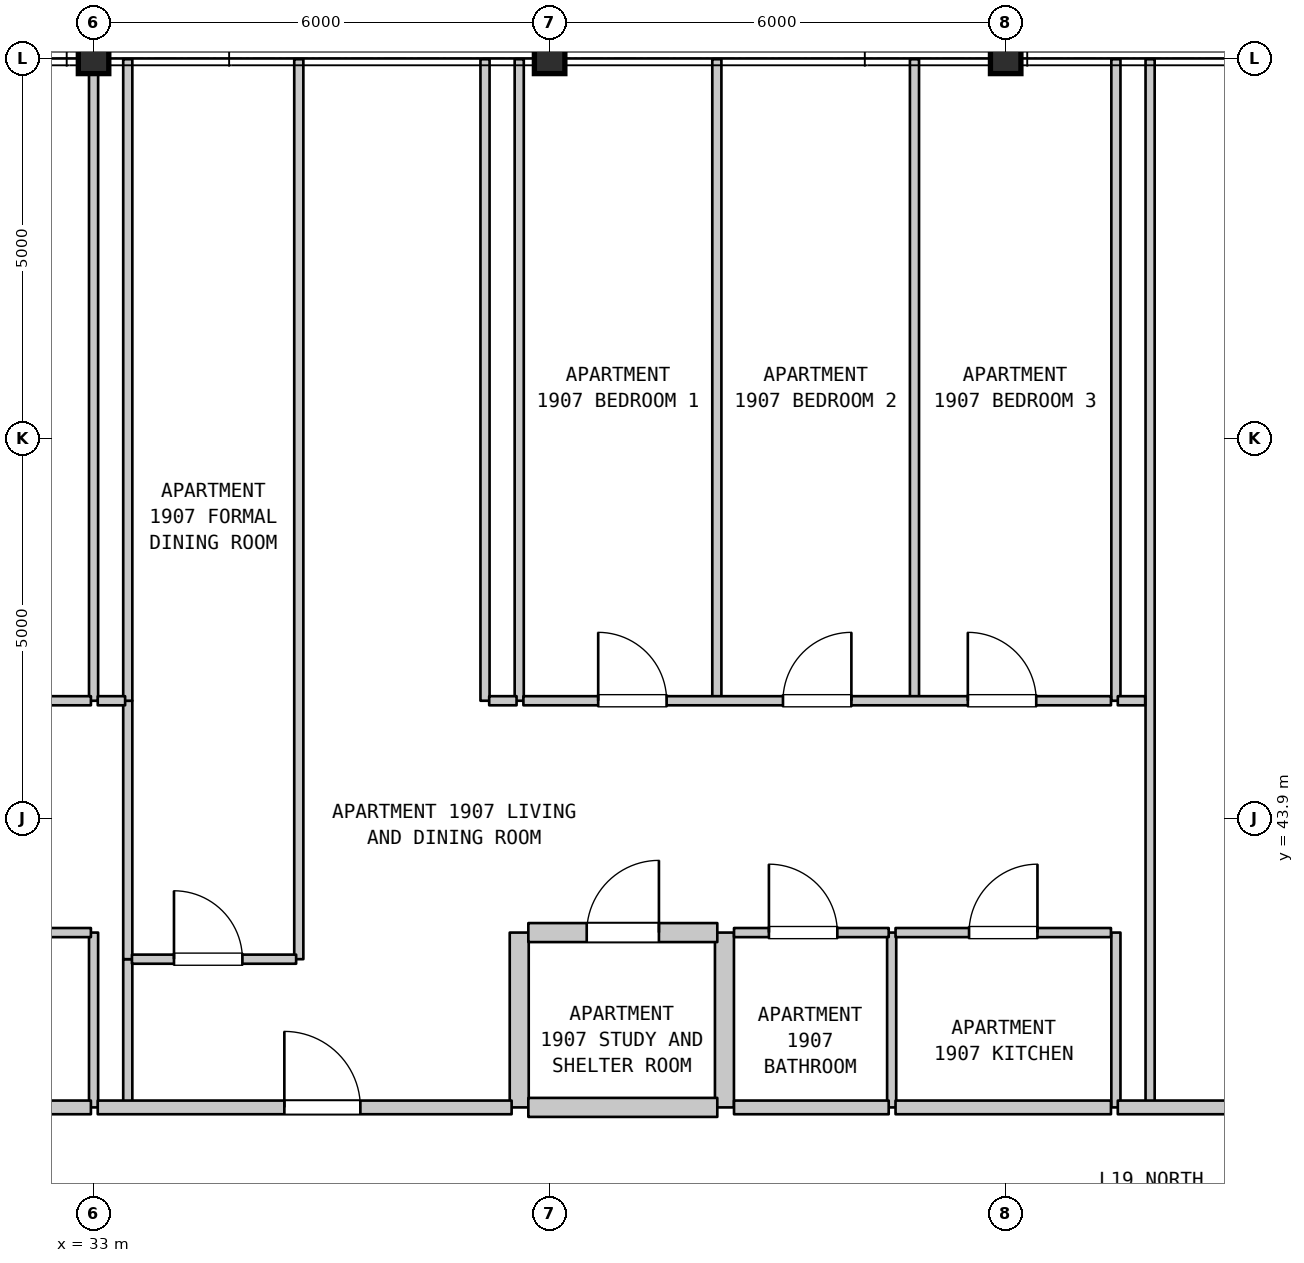
"""IFC4 building model, lengths in metres.
Left out: names, types, materials, properties, quantities, classifications, styles, units other than length and angle.
Written with IfcOpenShell. Run it as: python <this file> out.ifc"""

import sys

from ifc_helpers import new_model, si_unit, direction, frame, frame_2d, origin, origin_2d, place, context, subcontext, project, spatial, rectangle, i_section, extrude, element, fill, save


model = new_model("IFC4")
c1 = context("Model", 3, precision=1e-05, world=origin(), true_north=direction((0.0, 1.0)))
c2 = subcontext(c1, "Body", "Model", "MODEL_VIEW")
j1 = project(units=[si_unit("LENGTHUNIT", "METRE"), si_unit("PLANEANGLEUNIT", "RADIAN")], contexts=[c1])
p1 = place(None, origin())
s1 = spatial("IfcSite", under=j1, at=p1, CompositionType="ELEMENT")
p2 = place(p1, origin())
s2 = spatial("IfcBuilding", under=s1, at=p2, CompositionType="ELEMENT")
p3 = place(p2, frame((0.0, 0.0, 81.2)))
s3 = spatial("IfcBuildingStorey", under=s2, at=p3, CompositionType="ELEMENT", Elevation=81.2)
for number, where, z_axis, x_axis in (
    (1, (33.0, 53.9, 0.0), (0.0, 0.0, 1.0), (1.0, 0.0, 0.0)),
    (2, (39.0, 53.9, 0.0), (0.0, 0.0, 1.0), (1.0, 0.0, 0.0)),
    (3, (45.0, 53.9, 0.0), (0.0, 0.0, 1.0), (1.0, 0.0, 0.0)),
):
    element("IfcColumn", number, at=place(p3, frame(where, z_axis=z_axis, x_axis=x_axis)), inside=s3, PredefinedType="COLUMN", context=c2, shape_type="SweptSolid", body=[
        extrude(i_section(OverallWidth=0.401, OverallDepth=0.399, WebThickness=0.025, FlangeThickness=0.04, FilletRadius=0.015, at=origin_2d()), origin(), (0.0, 0.0, 1.0), 5.2),
    ])
p4 = place(p3, frame((33.0, 40.1, 0.0), z_axis=(0.0, 0.0, 1.0), x_axis=(0.0, 1.0, 0.0)))
e4 = element("IfcWall", 4, at=p4, inside=s3, PredefinedType="PARTITIONING", context=c2, shape_type="SweptSolid", body=[
    extrude(rectangle(XDim=2.3, YDim=0.12, at=frame_2d((1.15, 0.0))), origin(), (0.0, 0.0, 1.0), 4.285),
])
p5 = place(p3, frame((33.0, 45.45, 0.0), z_axis=(0.0, 0.0, 1.0), x_axis=(0.0, 1.0, 0.0)))
e5 = element("IfcWall", 5, at=p5, inside=s3, PredefinedType="PARTITIONING", context=c2, shape_type="SweptSolid", body=[
    extrude(rectangle(XDim=8.44, YDim=0.12, at=frame_2d((4.22, 0.0))), origin(), (0.0, 0.0, 1.0), 4.285),
])
p6 = place(p3, frame((33.45, 40.1, 0.0), z_axis=(0.0, 0.0, 1.0), x_axis=(0.0, 1.0, 0.0)))
e6 = element("IfcWall", 6, at=p6, inside=s3, PredefinedType="PARTITIONING", context=c2, shape_type="SweptSolid", body=[
    extrude(rectangle(XDim=1.95, YDim=0.12, at=frame_2d((0.975, 0.0))), origin(), (0.0, 0.0, 1.0), 4.885),
])
p7 = place(p3, frame((33.45, 42.05, 0.0), z_axis=(0.0, 0.0, 1.0), x_axis=(0.0, 1.0, 0.0)))
e7 = element("IfcWall", 7, at=p7, inside=s3, PredefinedType="PARTITIONING", context=c2, shape_type="SweptSolid", body=[
    extrude(rectangle(XDim=3.4, YDim=0.12, at=frame_2d((1.7, 0.0))), origin(), (0.0, 0.0, 1.0), 4.885),
])
p8 = place(p3, frame((33.45, 45.45, 0.0), z_axis=(0.0, 0.0, 1.0), x_axis=(0.0, 1.0, 0.0)))
e8 = element("IfcWall", 8, at=p8, inside=s3, PredefinedType="PARTITIONING", context=c2, shape_type="SweptSolid", body=[
    extrude(rectangle(XDim=8.44, YDim=0.12, at=frame_2d((4.22, 0.0))), origin(), (0.0, 0.0, 1.0), 4.885),
])
p9 = place(p3, frame((35.7, 42.05, 0.0), z_axis=(0.0, 0.0, 1.0), x_axis=(0.0, 1.0, 0.0)))
e9 = element("IfcWall", 9, at=p9, inside=s3, PredefinedType="PARTITIONING", context=c2, shape_type="SweptSolid", body=[
    extrude(rectangle(XDim=11.84, YDim=0.12, at=frame_2d((5.92, 0.0))), origin(), (0.0, 0.0, 1.0), 4.885),
])
p10 = place(p3, frame((38.15, 45.45, 0.0), z_axis=(0.0, 0.0, 1.0), x_axis=(0.0, 1.0, 0.0)))
e10 = element("IfcWall", 10, at=p10, inside=s3, PredefinedType="PARTITIONING", context=c2, shape_type="SweptSolid", body=[
    extrude(rectangle(XDim=8.44, YDim=0.12, at=frame_2d((4.22, 0.0))), origin(), (0.0, 0.0, 1.0), 4.885),
])
p11 = place(p3, frame((38.6, 40.1, 0.0), z_axis=(0.0, 0.0, 1.0), x_axis=(0.0, 1.0, 0.0)))
e11 = element("IfcWall", 11, at=p11, inside=s3, PredefinedType="STANDARD", context=c2, shape_type="SweptSolid", body=[
    extrude(rectangle(XDim=2.3, YDim=0.25, at=frame_2d((1.15, 0.0))), origin(), (0.0, 0.0, 1.0), 4.885),
])
for number, where, z_axis, x_axis in (
    (12, (38.6, 45.45, 0.0), (0.0, 0.0, 1.0), (0.0, 1.0, 0.0)),
    (13, (41.2, 45.45, 0.0), (0.0, 0.0, 1.0), (0.0, 1.0, 0.0)),
):
    element("IfcWall", number, at=place(p3, frame(where, z_axis=z_axis, x_axis=x_axis)), inside=s3, PredefinedType="PARTITIONING", context=c2, shape_type="SweptSolid", body=[
        extrude(rectangle(XDim=8.44, YDim=0.12, at=frame_2d((4.22, 0.0))), origin(), (0.0, 0.0, 1.0), 4.885),
    ])
p12 = place(p3, frame((41.3, 40.1, 0.0), z_axis=(0.0, 0.0, 1.0), x_axis=(0.0, 1.0, 0.0)))
e14 = element("IfcWall", 14, at=p12, inside=s3, PredefinedType="STANDARD", context=c2, shape_type="SweptSolid", body=[
    extrude(rectangle(XDim=2.3, YDim=0.25, at=frame_2d((1.15, 0.0))), origin(), (0.0, 0.0, 1.0), 4.885),
])
p13 = place(p3, frame((43.5, 40.1, 0.0), z_axis=(0.0, 0.0, 1.0), x_axis=(0.0, 1.0, 0.0)))
e15 = element("IfcWall", 15, at=p13, inside=s3, PredefinedType="PARTITIONING", context=c2, shape_type="SweptSolid", body=[
    extrude(rectangle(XDim=2.3, YDim=0.12, at=frame_2d((1.15, 0.0))), origin(), (0.0, 0.0, 1.0), 4.885),
])
p14 = place(p3, frame((43.8, 45.45, 0.0), z_axis=(0.0, 0.0, 1.0), x_axis=(0.0, 1.0, 0.0)))
e16 = element("IfcWall", 16, at=p14, inside=s3, PredefinedType="PARTITIONING", context=c2, shape_type="SweptSolid", body=[
    extrude(rectangle(XDim=8.44, YDim=0.12, at=frame_2d((4.22, 0.0))), origin(), (0.0, 0.0, 1.0), 4.885),
])
p15 = place(p3, frame((46.45, 40.1, 0.0), z_axis=(0.0, 0.0, 1.0), x_axis=(0.0, 1.0, 0.0)))
e17 = element("IfcWall", 17, at=p15, inside=s3, PredefinedType="PARTITIONING", context=c2, shape_type="SweptSolid", body=[
    extrude(rectangle(XDim=2.3, YDim=0.12, at=frame_2d((1.15, 0.0))), origin(), (0.0, 0.0, 1.0), 4.885),
])
p16 = place(p3, frame((46.45, 45.45, 0.0), z_axis=(0.0, 0.0, 1.0), x_axis=(0.0, 1.0, 0.0)))
e18 = element("IfcWall", 18, at=p16, inside=s3, PredefinedType="PARTITIONING", context=c2, shape_type="SweptSolid", body=[
    extrude(rectangle(XDim=8.44, YDim=0.12, at=frame_2d((4.22, 0.0))), origin(), (0.0, 0.0, 1.0), 4.885),
])
p17 = place(p3, frame((46.9, 40.1, 0.0), z_axis=(0.0, 0.0, 1.0), x_axis=(0.0, 1.0, 0.0)))
e19 = element("IfcWall", 19, at=p17, inside=s3, PredefinedType="PARTITIONING", context=c2, shape_type="SweptSolid", body=[
    extrude(rectangle(XDim=13.79, YDim=0.12, at=frame_2d((6.895, 0.0))), origin(), (0.0, 0.0, 1.0), 4.885),
])
p18 = place(p3, frame((29.523, 40.1, 0.0), z_axis=(0.0, 0.0, 1.0), x_axis=(1.0, 0.0, 0.0)))
e20 = element("IfcWall", 20, at=p18, inside=s3, PredefinedType="STANDARD", context=c2, shape_type="SweptSolid", body=[
    extrude(rectangle(XDim=3.442, YDim=0.18, at=frame_2d((1.721, 0.0))), origin(), (0.0, 0.0, 1.0), 4.885),
])
p19 = place(p3, frame((33.055, 40.1, 0.0), z_axis=(0.0, 0.0, 1.0), x_axis=(1.0, 0.0, 0.0)))
e21 = element("IfcWall", 21, at=p19, inside=s3, PredefinedType="STANDARD", context=c2, shape_type="SweptSolid", body=[
    extrude(rectangle(XDim=5.445, YDim=0.18, at=frame_2d((2.723, 0.0))), origin(), (0.0, 0.0, 1.0), 4.885),
])
p20 = place(p19, frame((2.455, 0.0, 0.0)))
e22 = element("IfcOpeningElement", 22, at=p20, cuts=e21, PredefinedType="OPENING", context=c2, shape_type="SweptSolid", body=[
    extrude(rectangle(XDim=1.0, YDim=2.15, at=frame_2d((0.5, 1.075))), frame((0.0, 0.1, 0.0), z_axis=(0.0, -1.0, 0.0), x_axis=(1.0, 0.0, 0.0)), (0.0, 0.0, 1.0), 0.2),
])
p21 = place(p3, frame((38.72, 40.1, 0.0), z_axis=(0.0, 0.0, 1.0), x_axis=(1.0, 0.0, 0.0)))
e23 = element("IfcWall", 23, at=p21, inside=s3, PredefinedType="STANDARD", context=c2, shape_type="SweptSolid", body=[
    extrude(rectangle(XDim=2.486, YDim=0.25, at=frame_2d((1.243, 0.0))), origin(), (0.0, 0.0, 1.0), 4.885),
])
p22 = place(p3, frame((41.426, 40.1, 0.0), z_axis=(0.0, 0.0, 1.0), x_axis=(1.0, 0.0, 0.0)))
e24 = element("IfcWall", 24, at=p22, inside=s3, PredefinedType="STANDARD", context=c2, shape_type="SweptSolid", body=[
    extrude(rectangle(XDim=2.035, YDim=0.18, at=frame_2d((1.018, 0.0))), origin(), (0.0, 0.0, 1.0), 4.885),
])
p23 = place(p3, frame((43.551, 40.1, 0.0), z_axis=(0.0, 0.0, 1.0), x_axis=(1.0, 0.0, 0.0)))
e25 = element("IfcWall", 25, at=p23, inside=s3, PredefinedType="STANDARD", context=c2, shape_type="SweptSolid", body=[
    extrude(rectangle(XDim=2.834, YDim=0.18, at=frame_2d((1.417, 0.0))), origin(), (0.0, 0.0, 1.0), 4.885),
])
p24 = place(p3, frame((46.475, 40.1, 0.0), z_axis=(0.0, 0.0, 1.0), x_axis=(1.0, 0.0, 0.0)))
e26 = element("IfcWall", 26, at=p24, inside=s3, PredefinedType="STANDARD", context=c2, shape_type="SweptSolid", body=[
    extrude(rectangle(XDim=5.47, YDim=0.18, at=frame_2d((2.735, 0.0))), origin(), (0.0, 0.0, 1.0), 4.885),
])
p25 = place(p24, frame((2.435, 0.0, 0.0)))
e27 = element("IfcOpeningElement", 27, at=p25, cuts=e26, PredefinedType="OPENING", context=c2, shape_type="SweptSolid", body=[
    extrude(rectangle(XDim=1.0, YDim=2.15, at=frame_2d((0.5, 1.075))), frame((0.0, 0.1, 0.0), z_axis=(0.0, -1.0, 0.0), x_axis=(1.0, 0.0, 0.0)), (0.0, 0.0, 1.0), 0.2),
])
p26 = place(p3, frame((33.505, 42.05, 0.0), z_axis=(0.0, 0.0, 1.0), x_axis=(1.0, 0.0, 0.0)))
e28 = element("IfcWall", 28, at=p26, inside=s3, PredefinedType="PARTITIONING", context=c2, shape_type="SweptSolid", body=[
    extrude(rectangle(XDim=2.16, YDim=0.12, at=frame_2d((1.08, 0.0))), origin(), (0.0, 0.0, 1.0), 4.885),
])
p27 = place(p26, frame((0.553, 0.0, 0.0)))
e29 = element("IfcOpeningElement", 29, at=p27, cuts=e28, PredefinedType="OPENING", context=c2, shape_type="SweptSolid", body=[
    extrude(rectangle(XDim=0.9, YDim=2.15, at=frame_2d((0.45, 1.075))), frame((0.0, 0.07, 0.0), z_axis=(0.0, -1.0, 0.0), x_axis=(1.0, 0.0, 0.0)), (0.0, 0.0, 1.0), 0.14),
])
p28 = place(p3, frame((29.523, 42.4, 0.0), z_axis=(0.0, 0.0, 1.0), x_axis=(1.0, 0.0, 0.0)))
e30 = element("IfcWall", 30, at=p28, inside=s3, PredefinedType="PARTITIONING", context=c2, shape_type="SweptSolid", body=[
    extrude(rectangle(XDim=3.442, YDim=0.12, at=frame_2d((1.721, 0.0))), origin(), (0.0, 0.0, 1.0), 4.885),
])
p29 = place(p28, frame((1.2, 0.0, 0.0)))
e31 = element("IfcOpeningElement", 31, at=p29, cuts=e30, PredefinedType="OPENING", context=c2, shape_type="SweptSolid", body=[
    extrude(rectangle(XDim=0.9, YDim=2.1, at=frame_2d((0.45, 1.05))), frame((0.0, 0.07, 0.0), z_axis=(0.0, -1.0, 0.0), x_axis=(1.0, 0.0, 0.0)), (0.0, 0.0, 1.0), 0.14),
])
p30 = place(p3, frame((38.72, 42.4, 0.0), z_axis=(0.0, 0.0, 1.0), x_axis=(1.0, 0.0, 0.0)))
e32 = element("IfcWall", 32, at=p30, inside=s3, PredefinedType="STANDARD", context=c2, shape_type="SweptSolid", body=[
    extrude(rectangle(XDim=2.486, YDim=0.25, at=frame_2d((1.243, 0.0))), origin(), (0.0, 0.0, 1.0), 4.885),
])
p31 = place(p30, frame((0.768, 0.0, 0.0)))
e33 = element("IfcOpeningElement", 33, at=p31, cuts=e32, PredefinedType="OPENING", context=c2, shape_type="SweptSolid", body=[
    extrude(rectangle(XDim=0.95, YDim=2.15, at=frame_2d((0.475, 1.075))), frame((0.0, 0.135, 0.0), z_axis=(0.0, -1.0, 0.0), x_axis=(1.0, 0.0, 0.0)), (0.0, 0.0, 1.0), 0.27),
])
p32 = place(p3, frame((41.426, 42.4, 0.0), z_axis=(0.0, 0.0, 1.0), x_axis=(1.0, 0.0, 0.0)))
e34 = element("IfcWall", 34, at=p32, inside=s3, PredefinedType="PARTITIONING", context=c2, shape_type="SweptSolid", body=[
    extrude(rectangle(XDim=2.035, YDim=0.12, at=frame_2d((1.018, 0.0))), origin(), (0.0, 0.0, 1.0), 4.885),
])
p33 = place(p32, frame((0.459, 0.0, 0.0)))
e35 = element("IfcOpeningElement", 35, at=p33, cuts=e34, PredefinedType="OPENING", context=c2, shape_type="SweptSolid", body=[
    extrude(rectangle(XDim=0.9, YDim=2.1, at=frame_2d((0.45, 1.05))), frame((0.0, 0.07, 0.0), z_axis=(0.0, -1.0, 0.0), x_axis=(1.0, 0.0, 0.0)), (0.0, 0.0, 1.0), 0.14),
])
p34 = place(p3, frame((43.551, 42.4, 0.0), z_axis=(0.0, 0.0, 1.0), x_axis=(1.0, 0.0, 0.0)))
e36 = element("IfcWall", 36, at=p34, inside=s3, PredefinedType="PARTITIONING", context=c2, shape_type="SweptSolid", body=[
    extrude(rectangle(XDim=2.834, YDim=0.12, at=frame_2d((1.417, 0.0))), origin(), (0.0, 0.0, 1.0), 4.885),
])
p35 = place(p34, frame((0.967, 0.0, 0.0)))
e37 = element("IfcOpeningElement", 37, at=p35, cuts=e36, PredefinedType="OPENING", context=c2, shape_type="SweptSolid", body=[
    extrude(rectangle(XDim=0.9, YDim=2.15, at=frame_2d((0.45, 1.075))), frame((0.0, 0.07, 0.0), z_axis=(0.0, -1.0, 0.0), x_axis=(1.0, 0.0, 0.0)), (0.0, 0.0, 1.0), 0.14),
])
p36 = place(p3, frame((26.515, 45.45, 0.0), z_axis=(0.0, 0.0, 1.0), x_axis=(1.0, 0.0, 0.0)))
e38 = element("IfcWall", 38, at=p36, inside=s3, PredefinedType="PARTITIONING", context=c2, shape_type="SweptSolid", body=[
    extrude(rectangle(XDim=6.45, YDim=0.12, at=frame_2d((3.225, 0.0))), origin(), (0.0, 0.0, 1.0), 4.885),
])
p37 = place(p36, frame((1.315, 0.0, 0.0)))
e39 = element("IfcOpeningElement", 39, at=p37, cuts=e38, PredefinedType="OPENING", context=c2, shape_type="SweptSolid", body=[
    extrude(rectangle(XDim=0.9, YDim=2.15, at=frame_2d((0.45, 1.075))), frame((0.0, 0.07, 0.0), z_axis=(0.0, -1.0, 0.0), x_axis=(1.0, 0.0, 0.0)), (0.0, 0.0, 1.0), 0.14),
])
p38 = place(p36, frame((4.235, 0.0, 0.0)))
e40 = element("IfcOpeningElement", 40, at=p38, cuts=e38, PredefinedType="OPENING", context=c2, shape_type="SweptSolid", body=[
    extrude(rectangle(XDim=0.9, YDim=2.15, at=frame_2d((0.45, 1.075))), frame((0.0, 0.07, 0.0), z_axis=(0.0, -1.0, 0.0), x_axis=(1.0, 0.0, 0.0)), (0.0, 0.0, 1.0), 0.14),
])
p39 = place(p3, frame((33.055, 45.45, 0.0), z_axis=(0.0, 0.0, 1.0), x_axis=(1.0, 0.0, 0.0)))
e41 = element("IfcWall", 41, at=p39, inside=s3, PredefinedType="PARTITIONING", context=c2, shape_type="SweptSolid", body=[
    extrude(rectangle(XDim=0.36, YDim=0.12, at=frame_2d((0.18, 0.0))), origin(), (0.0, 0.0, 1.0), 4.885),
])
p40 = place(p3, frame((38.205, 45.45, 0.0), z_axis=(0.0, 0.0, 1.0), x_axis=(1.0, 0.0, 0.0)))
e42 = element("IfcWall", 42, at=p40, inside=s3, PredefinedType="PARTITIONING", context=c2, shape_type="SweptSolid", body=[
    extrude(rectangle(XDim=0.36, YDim=0.12, at=frame_2d((0.18, 0.0))), origin(), (0.0, 0.0, 1.0), 4.885),
])
p41 = place(p3, frame((38.655, 45.45, 0.0), z_axis=(0.0, 0.0, 1.0), x_axis=(1.0, 0.0, 0.0)))
e43 = element("IfcWall", 43, at=p41, inside=s3, PredefinedType="PARTITIONING", context=c2, shape_type="SweptSolid", body=[
    extrude(rectangle(XDim=7.73, YDim=0.12, at=frame_2d((3.865, 0.0))), origin(), (0.0, 0.0, 1.0), 4.885),
])
p42 = place(p41, frame((0.984, 0.0, 0.0)))
e44 = element("IfcOpeningElement", 44, at=p42, cuts=e43, PredefinedType="OPENING", context=c2, shape_type="SweptSolid", body=[
    extrude(rectangle(XDim=0.9, YDim=2.15, at=frame_2d((0.45, 1.075))), frame((0.0, 0.07, 0.0), z_axis=(0.0, -1.0, 0.0), x_axis=(1.0, 0.0, 0.0)), (0.0, 0.0, 1.0), 0.14),
])
p43 = place(p41, frame((3.415, 0.0, 0.0)))
e45 = element("IfcOpeningElement", 45, at=p43, cuts=e43, PredefinedType="OPENING", context=c2, shape_type="SweptSolid", body=[
    extrude(rectangle(XDim=0.9, YDim=2.15, at=frame_2d((0.45, 1.075))), frame((0.0, 0.07, 0.0), z_axis=(0.0, -1.0, 0.0), x_axis=(1.0, 0.0, 0.0)), (0.0, 0.0, 1.0), 0.14),
])
p44 = place(p41, frame((5.847, 0.0, 0.0)))
e46 = element("IfcOpeningElement", 46, at=p44, cuts=e43, PredefinedType="OPENING", context=c2, shape_type="SweptSolid", body=[
    extrude(rectangle(XDim=0.9, YDim=2.15, at=frame_2d((0.45, 1.075))), frame((0.0, 0.07, 0.0), z_axis=(0.0, -1.0, 0.0), x_axis=(1.0, 0.0, 0.0)), (0.0, 0.0, 1.0), 0.14),
])
p45 = place(p3, frame((46.475, 45.45, 0.0), z_axis=(0.0, 0.0, 1.0), x_axis=(1.0, 0.0, 0.0)))
e47 = element("IfcWall", 47, at=p45, inside=s3, PredefinedType="PARTITIONING", context=c2, shape_type="SweptSolid", body=[
    extrude(rectangle(XDim=0.36, YDim=0.12, at=frame_2d((0.18, 0.0))), origin(), (0.0, 0.0, 1.0), 4.885),
])
p46 = place(p20, origin())
e48 = element("IfcDoor", 48, at=p46, inside=s3, OperationType="SINGLE_SWING_LEFT", PredefinedType="DOOR", context=c2, shape_type="SweptSolid", body=[
    extrude(rectangle(XDim=1.0, YDim=2.15, at=frame_2d((0.5, 1.075))), frame((0.0, 0.025, 0.0), z_axis=(0.0, -1.0, 0.0), x_axis=(1.0, 0.0, 0.0)), (0.0, 0.0, 1.0), 0.05),
])
fill(e22, e48)
p47 = place(p27, origin())
e49 = element("IfcDoor", 49, at=p47, inside=s3, OperationType="SINGLE_SWING_LEFT", PredefinedType="DOOR", context=c2, shape_type="SweptSolid", body=[
    extrude(rectangle(XDim=0.9, YDim=2.15, at=frame_2d((0.45, 1.075))), frame((0.0, 0.025, 0.0), z_axis=(0.0, -1.0, 0.0), x_axis=(1.0, 0.0, 0.0)), (0.0, 0.0, 1.0), 0.05),
])
fill(e29, e49)
p48 = place(p31, origin())
e50 = element("IfcDoor", 50, at=p48, inside=s3, OperationType="SINGLE_SWING_RIGHT", PredefinedType="DOOR", context=c2, shape_type="SweptSolid", body=[
    extrude(rectangle(XDim=0.95, YDim=2.15, at=frame_2d((0.475, 1.075))), frame((0.0, 0.025, 0.0), z_axis=(0.0, -1.0, 0.0), x_axis=(1.0, 0.0, 0.0)), (0.0, 0.0, 1.0), 0.05),
])
fill(e33, e50)
p49 = place(p33, origin())
e51 = element("IfcDoor", 51, at=p49, inside=s3, OperationType="SINGLE_SWING_LEFT", PredefinedType="DOOR", context=c2, shape_type="SweptSolid", body=[
    extrude(rectangle(XDim=0.9, YDim=2.1, at=frame_2d((0.45, 1.05))), frame((0.0, 0.025, 0.0), z_axis=(0.0, -1.0, 0.0), x_axis=(1.0, 0.0, 0.0)), (0.0, 0.0, 1.0), 0.05),
])
fill(e35, e51)
p50 = place(p35, origin())
e52 = element("IfcDoor", 52, at=p50, inside=s3, OperationType="SINGLE_SWING_RIGHT", PredefinedType="DOOR", context=c2, shape_type="SweptSolid", body=[
    extrude(rectangle(XDim=0.9, YDim=2.15, at=frame_2d((0.45, 1.075))), frame((0.0, 0.025, 0.0), z_axis=(0.0, -1.0, 0.0), x_axis=(1.0, 0.0, 0.0)), (0.0, 0.0, 1.0), 0.05),
])
fill(e37, e52)
p51 = place(p42, origin())
e53 = element("IfcDoor", 53, at=p51, inside=s3, OperationType="SINGLE_SWING_LEFT", PredefinedType="DOOR", context=c2, shape_type="SweptSolid", body=[
    extrude(rectangle(XDim=0.9, YDim=2.15, at=frame_2d((0.45, 1.075))), frame((0.0, 0.025, 0.0), z_axis=(0.0, -1.0, 0.0), x_axis=(1.0, 0.0, 0.0)), (0.0, 0.0, 1.0), 0.05),
])
fill(e44, e53)
p52 = place(p43, origin())
e54 = element("IfcDoor", 54, at=p52, inside=s3, OperationType="SINGLE_SWING_RIGHT", PredefinedType="DOOR", context=c2, shape_type="SweptSolid", body=[
    extrude(rectangle(XDim=0.9, YDim=2.15, at=frame_2d((0.45, 1.075))), frame((0.0, 0.025, 0.0), z_axis=(0.0, -1.0, 0.0), x_axis=(1.0, 0.0, 0.0)), (0.0, 0.0, 1.0), 0.05),
])
fill(e45, e54)
p53 = place(p44, origin())
e55 = element("IfcDoor", 55, at=p53, inside=s3, OperationType="SINGLE_SWING_LEFT", PredefinedType="DOOR", context=c2, shape_type="SweptSolid", body=[
    extrude(rectangle(XDim=0.9, YDim=2.15, at=frame_2d((0.45, 1.075))), frame((0.0, 0.025, 0.0), z_axis=(0.0, -1.0, 0.0), x_axis=(1.0, 0.0, 0.0)), (0.0, 0.0, 1.0), 0.05),
])
fill(e46, e55)
save(model, sys.argv[1])
